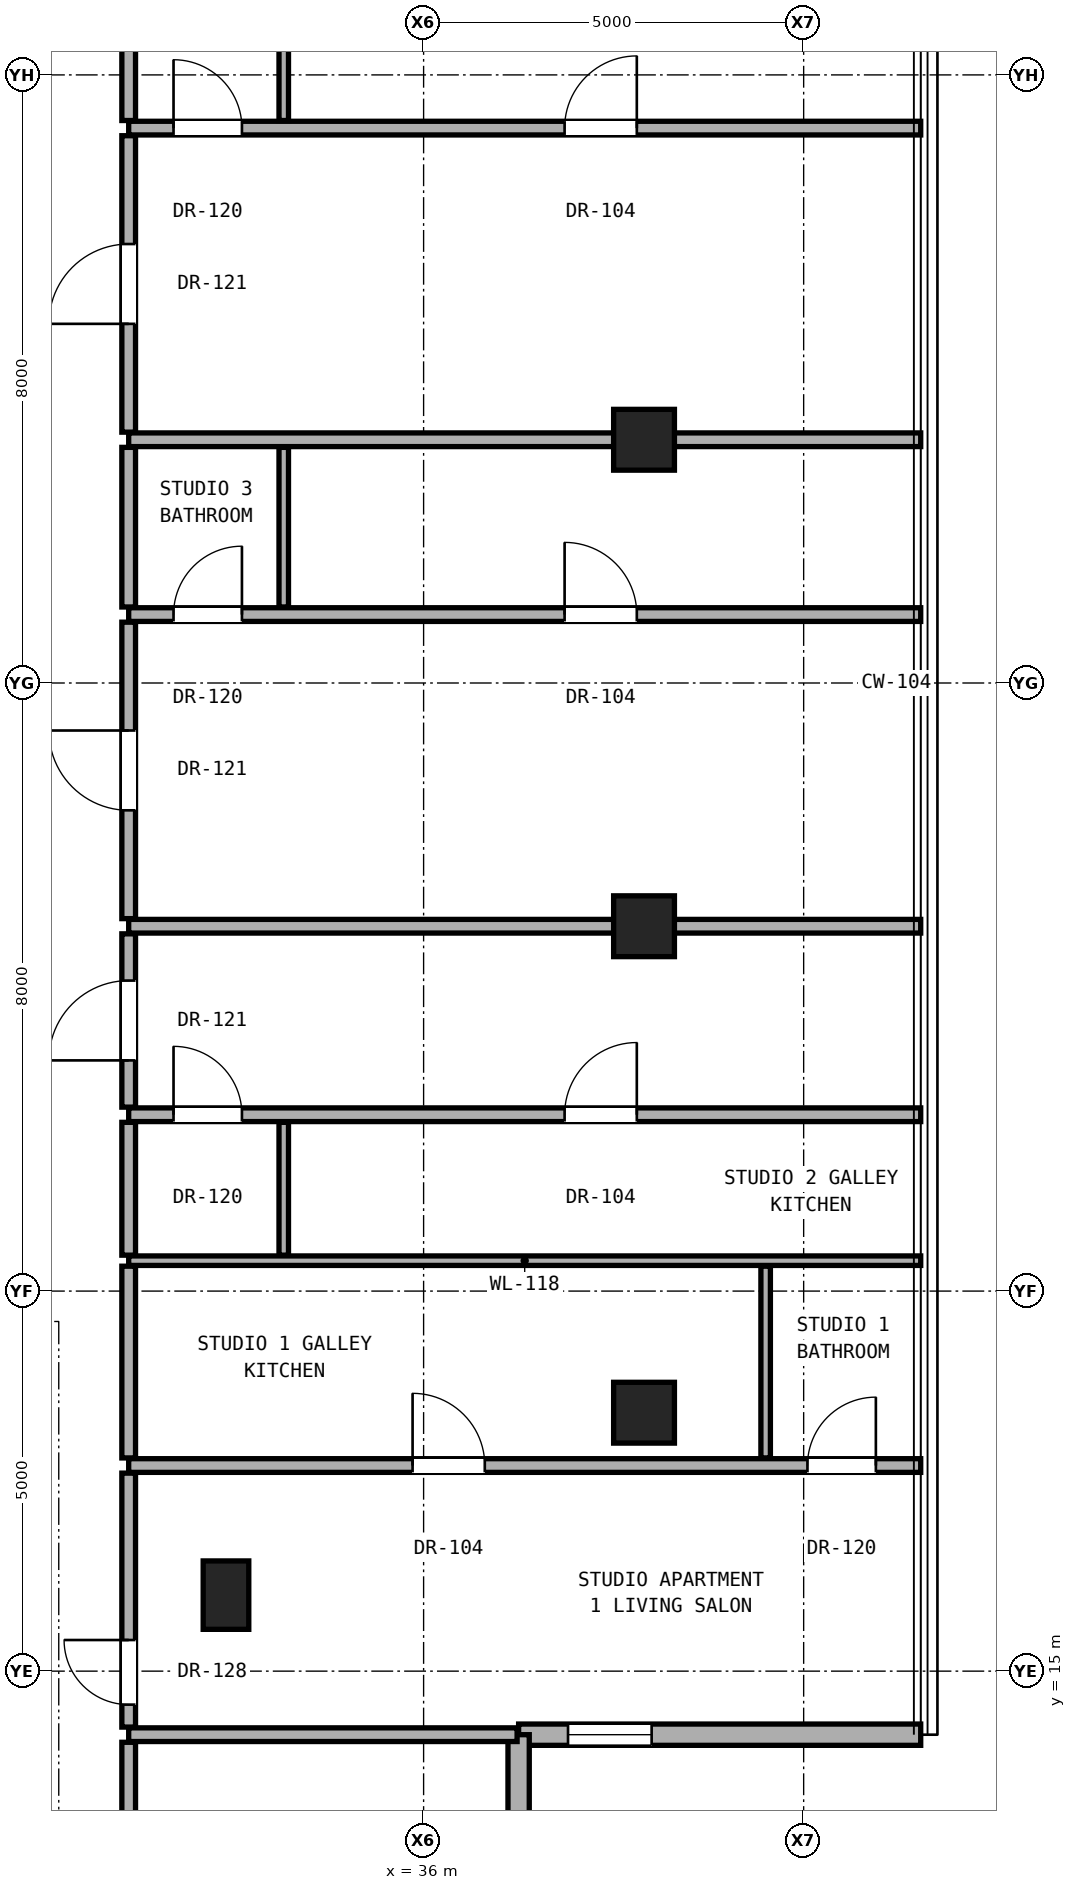
"""IFC4 building model, lengths in metres.
Left out: names, types, materials, properties, quantities, classifications, styles, units other than length and angle.
Written with IfcOpenShell. Run it as: python <this file> out.ifc"""

import sys

from ifc_helpers import new_model, si_unit, direction, frame, frame_2d, origin, origin_2d, place, context, subcontext, project, spatial, rectangle, hollow_rectangle, extrude, element, fill, save


model = new_model("IFC4")
c1 = context("Model", 3, precision=1e-05, world=origin(), true_north=direction((0.0, 1.0)))
c2 = subcontext(c1, "Body", "Model", "MODEL_VIEW")
j1 = project(units=[si_unit("LENGTHUNIT", "METRE"), si_unit("PLANEANGLEUNIT", "RADIAN")], contexts=[c1])
p1 = place(None, origin())
s1 = spatial("IfcSite", under=j1, at=p1, CompositionType="ELEMENT")
p2 = place(p1, origin())
s2 = spatial("IfcBuilding", under=s1, at=p2, CompositionType="ELEMENT")
p3 = place(p2, frame((0.0, 0.0, 242.5)))
s3 = spatial("IfcBuildingStorey", under=s2, at=p3, CompositionType="ELEMENT", Elevation=242.5)
for number, where, z_axis, x_axis in (
    (1, (38.9, 18.4, 0.0), (0.0, 0.0, 1.0), (1.0, 0.0, 0.0)),
    (2, (38.9, 24.8, 0.0), (0.0, 0.0, 1.0), (1.0, 0.0, 0.0)),
    (3, (38.9, 31.2, 0.0), (0.0, 0.0, 1.0), (1.0, 0.0, 0.0)),
):
    element("IfcColumn", number, at=place(p3, frame(where, z_axis=z_axis, x_axis=x_axis)), inside=s3, PredefinedType="COLUMN", context=c2, shape_type="SweptSolid", body=[
        extrude(hollow_rectangle(XDim=0.8, YDim=0.8, WallThickness=0.045, at=origin_2d()), origin(), (0.0, 0.0, 1.0), 3.3),
    ])
p4 = place(p3, frame((33.4, 16.0, 0.0), z_axis=(0.0, 0.0, 1.0), x_axis=(1.0, 0.0, 0.0)))
e4 = element("IfcColumn", 4, at=p4, inside=s3, PredefinedType="PILASTER", context=c2, shape_type="SweptSolid", body=[
    extrude(rectangle(XDim=0.6, YDim=0.9, at=origin_2d()), origin(), (0.0, 0.0, 1.0), 3.3),
])
p5 = place(p3, frame((37.25, 14.164, 0.0), z_axis=(0.0, 0.0, 1.0), x_axis=(1.0, 0.0, 0.0)))
e5 = element("IfcWall", 5, at=p5, inside=s3, PredefinedType="SOLIDWALL", context=c2, shape_type="SweptSolid", body=[
    extrude(rectangle(XDim=5.29, YDim=0.28, at=frame_2d((2.645, 0.0))), origin(), (0.0, 0.0, 1.0), 3.08),
])
p6 = place(p5, frame((0.65, 0.0, 0.85)))
e6 = element("IfcOpeningElement", 6, at=p6, cuts=e5, PredefinedType="OPENING", context=c2, shape_type="SweptSolid", body=[
    extrude(rectangle(XDim=1.1, YDim=2.0, at=frame_2d((0.55, 1.0))), frame((0.0, 0.15, 0.0), z_axis=(0.0, -1.0, 0.0), x_axis=(1.0, 0.0, 0.0)), (0.0, 0.0, 1.0), 0.3),
])
p7 = place(p3, frame((37.25, 8.874, 0.0), z_axis=(0.0, 0.0, 1.0), x_axis=(0.0, 1.0, 0.0)))
e7 = element("IfcWall", 7, at=p7, inside=s3, PredefinedType="SOLIDWALL", context=c2, shape_type="SweptSolid", body=[
    extrude(rectangle(XDim=5.29, YDim=0.28, at=frame_2d((2.645, 0.0))), origin(), (0.0, 0.0, 1.0), 3.08),
])
p8 = place(p3, frame((32.12, 14.164, 0.0), z_axis=(0.0, 0.0, 1.0), x_axis=(1.0, 0.0, 0.0)))
e8 = element("IfcWall", 8, at=p8, inside=s3, PredefinedType="PARTITIONING", context=c2, shape_type="SweptSolid", body=[
    extrude(rectangle(XDim=5.11, YDim=0.18, at=frame_2d((2.555, 0.0))), origin(), (0.0, 0.0, 1.0), 3.1),
])
p9 = place(p3, frame((32.12, 17.705, 0.0), z_axis=(0.0, 0.0, 1.0), x_axis=(1.0, 0.0, 0.0)))
e9 = element("IfcWall", 9, at=p9, inside=s3, PredefinedType="PARTITIONING", context=c2, shape_type="SweptSolid", body=[
    extrude(rectangle(XDim=10.42, YDim=0.18, at=frame_2d((5.21, 0.0))), origin(), (0.0, 0.0, 1.0), 2.543),
])
p10 = place(p9, frame((3.735, 0.0, 0.0)))
e10 = element("IfcOpeningElement", 10, at=p10, cuts=e9, PredefinedType="OPENING", context=c2, shape_type="SweptSolid", body=[
    extrude(rectangle(XDim=0.95, YDim=2.15, at=frame_2d((0.475, 1.075))), frame((0.0, 0.1, 0.0), z_axis=(0.0, -1.0, 0.0), x_axis=(1.0, 0.0, 0.0)), (0.0, 0.0, 1.0), 0.2),
])
p11 = place(p9, frame((8.93, 0.0, 0.0)))
e11 = element("IfcOpeningElement", 11, at=p11, cuts=e9, PredefinedType="OPENING", context=c2, shape_type="SweptSolid", body=[
    extrude(rectangle(XDim=0.9, YDim=2.1, at=frame_2d((0.45, 1.05))), frame((0.0, 0.1, 0.0), z_axis=(0.0, -1.0, 0.0), x_axis=(1.0, 0.0, 0.0)), (0.0, 0.0, 1.0), 0.2),
])
p12 = place(p3, frame((32.12, 20.4, 0.0), z_axis=(0.0, 0.0, 1.0), x_axis=(1.0, 0.0, 0.0)))
e12 = element("IfcWall", 12, at=p12, inside=s3, PredefinedType="PARTITIONING", context=c2, shape_type="SweptSolid", body=[
    extrude(rectangle(XDim=10.42, YDim=0.125, at=frame_2d((5.21, 0.0))), origin(), (0.0, 0.0, 1.0), 2.319),
])
p13 = place(p3, frame((32.12, 22.32, 0.0), z_axis=(0.0, 0.0, 1.0), x_axis=(1.0, 0.0, 0.0)))
e13 = element("IfcWall", 13, at=p13, inside=s3, PredefinedType="PARTITIONING", context=c2, shape_type="SweptSolid", body=[
    extrude(rectangle(XDim=10.42, YDim=0.18, at=frame_2d((5.21, 0.0))), origin(), (0.0, 0.0, 1.0), 2.319),
])
p14 = place(p13, frame((5.735, 0.0, 0.0)))
e14 = element("IfcOpeningElement", 14, at=p14, cuts=e13, PredefinedType="OPENING", context=c2, shape_type="SweptSolid", body=[
    extrude(rectangle(XDim=0.95, YDim=2.15, at=frame_2d((0.475, 1.075))), frame((0.0, 0.1, 0.0), z_axis=(0.0, -1.0, 0.0), x_axis=(1.0, 0.0, 0.0)), (0.0, 0.0, 1.0), 0.2),
])
p15 = place(p13, frame((0.59, 0.0, 0.0)))
e15 = element("IfcOpeningElement", 15, at=p15, cuts=e13, PredefinedType="OPENING", context=c2, shape_type="SweptSolid", body=[
    extrude(rectangle(XDim=0.9, YDim=2.1, at=frame_2d((0.45, 1.05))), frame((0.0, 0.1, 0.0), z_axis=(0.0, -1.0, 0.0), x_axis=(1.0, 0.0, 0.0)), (0.0, 0.0, 1.0), 0.2),
])
p16 = place(p3, frame((32.12, 24.8, 0.0), z_axis=(0.0, 0.0, 1.0), x_axis=(1.0, 0.0, 0.0)))
e16 = element("IfcWall", 16, at=p16, inside=s3, PredefinedType="PARTITIONING", context=c2, shape_type="SweptSolid", body=[
    extrude(rectangle(XDim=10.42, YDim=0.18, at=frame_2d((5.21, 0.0))), origin(), (0.0, 0.0, 1.0), 2.319),
])
p17 = place(p3, frame((32.12, 28.9, 0.0), z_axis=(0.0, 0.0, 1.0), x_axis=(1.0, 0.0, 0.0)))
e17 = element("IfcWall", 17, at=p17, inside=s3, PredefinedType="PARTITIONING", context=c2, shape_type="SweptSolid", body=[
    extrude(rectangle(XDim=10.42, YDim=0.18, at=frame_2d((5.21, 0.0))), origin(), (0.0, 0.0, 1.0), 2.319),
])
p18 = place(p17, frame((5.735, 0.0, 0.0)))
e18 = element("IfcOpeningElement", 18, at=p18, cuts=e17, PredefinedType="OPENING", context=c2, shape_type="SweptSolid", body=[
    extrude(rectangle(XDim=0.95, YDim=2.15, at=frame_2d((0.475, 1.075))), frame((0.0, 0.1, 0.0), z_axis=(0.0, -1.0, 0.0), x_axis=(1.0, 0.0, 0.0)), (0.0, 0.0, 1.0), 0.2),
])
p19 = place(p17, frame((0.59, 0.0, 0.0)))
e19 = element("IfcOpeningElement", 19, at=p19, cuts=e17, PredefinedType="OPENING", context=c2, shape_type="SweptSolid", body=[
    extrude(rectangle(XDim=0.9, YDim=2.1, at=frame_2d((0.45, 1.05))), frame((0.0, 0.1, 0.0), z_axis=(0.0, -1.0, 0.0), x_axis=(1.0, 0.0, 0.0)), (0.0, 0.0, 1.0), 0.2),
])
p20 = place(p3, frame((32.12, 31.2, 0.0), z_axis=(0.0, 0.0, 1.0), x_axis=(1.0, 0.0, 0.0)))
e20 = element("IfcWall", 20, at=p20, inside=s3, PredefinedType="PARTITIONING", context=c2, shape_type="SweptSolid", body=[
    extrude(rectangle(XDim=10.42, YDim=0.18, at=frame_2d((5.21, 0.0))), origin(), (0.0, 0.0, 1.0), 2.319),
])
p21 = place(p3, frame((32.12, 35.3, 0.0), z_axis=(0.0, 0.0, 1.0), x_axis=(1.0, 0.0, 0.0)))
e21 = element("IfcWall", 21, at=p21, inside=s3, PredefinedType="PARTITIONING", context=c2, shape_type="SweptSolid", body=[
    extrude(rectangle(XDim=10.42, YDim=0.18, at=frame_2d((5.21, 0.0))), origin(), (0.0, 0.0, 1.0), 2.319),
])
p22 = place(p21, frame((5.735, 0.0, 0.0)))
e22 = element("IfcOpeningElement", 22, at=p22, cuts=e21, PredefinedType="OPENING", context=c2, shape_type="SweptSolid", body=[
    extrude(rectangle(XDim=0.95, YDim=2.15, at=frame_2d((0.475, 1.075))), frame((0.0, 0.1, 0.0), z_axis=(0.0, -1.0, 0.0), x_axis=(1.0, 0.0, 0.0)), (0.0, 0.0, 1.0), 0.2),
])
p23 = place(p21, frame((0.59, 0.0, 0.0)))
e23 = element("IfcOpeningElement", 23, at=p23, cuts=e21, PredefinedType="OPENING", context=c2, shape_type="SweptSolid", body=[
    extrude(rectangle(XDim=0.9, YDim=2.1, at=frame_2d((0.45, 1.05))), frame((0.0, 0.1, 0.0), z_axis=(0.0, -1.0, 0.0), x_axis=(1.0, 0.0, 0.0)), (0.0, 0.0, 1.0), 0.2),
])
p24 = place(p3, frame((32.12, 8.874, 0.0), z_axis=(0.0, 0.0, 1.0), x_axis=(0.0, 1.0, 0.0)))
e24 = element("IfcWall", 24, at=p24, inside=s3, PredefinedType="PARTITIONING", context=c2, shape_type="SweptSolid", body=[
    extrude(rectangle(XDim=5.19, YDim=0.18, at=frame_2d((2.595, 0.0))), origin(), (0.0, 0.0, 1.0), 3.1),
])
p25 = place(p24, frame((2.12, 0.0, 0.0)))
e25 = element("IfcOpeningElement", 25, at=p25, cuts=e24, PredefinedType="OPENING", context=c2, shape_type="SweptSolid", body=[
    extrude(rectangle(XDim=0.95, YDim=2.15, at=frame_2d((0.475, 1.075))), frame((0.0, 0.1, 0.0), z_axis=(0.0, -1.0, 0.0), x_axis=(1.0, 0.0, 0.0)), (0.0, 0.0, 1.0), 0.2),
])
p26 = place(p3, frame((32.12, 14.264, 0.0), z_axis=(0.0, 0.0, 1.0), x_axis=(0.0, 1.0, 0.0)))
e26 = element("IfcWall", 26, at=p26, inside=s3, PredefinedType="PARTITIONING", context=c2, shape_type="SweptSolid", body=[
    extrude(rectangle(XDim=3.341, YDim=0.18, at=frame_2d((1.67, 0.0))), origin(), (0.0, 0.0, 1.0), 2.543),
])
p27 = place(p26, frame((0.295, 0.0, 0.0)))
e27 = element("IfcOpeningElement", 27, at=p27, cuts=e26, PredefinedType="OPENING", context=c2, shape_type="SweptSolid", body=[
    extrude(rectangle(XDim=0.85, YDim=2.01, at=frame_2d((0.425, 1.005))), frame((0.0, 0.1, 0.0), z_axis=(0.0, -1.0, 0.0), x_axis=(1.0, 0.0, 0.0)), (0.0, 0.0, 1.0), 0.2),
])
p28 = place(p3, frame((32.12, 17.805, 0.0), z_axis=(0.0, 0.0, 1.0), x_axis=(0.0, 1.0, 0.0)))
e28 = element("IfcWall", 28, at=p28, inside=s3, PredefinedType="PARTITIONING", context=c2, shape_type="SweptSolid", body=[
    extrude(rectangle(XDim=2.522, YDim=0.18, at=frame_2d((1.261, 0.0))), origin(), (0.0, 0.0, 1.0), 2.492),
])
p29 = place(p3, frame((32.12, 20.472, 0.0), z_axis=(0.0, 0.0, 1.0), x_axis=(0.0, 1.0, 0.0)))
e29 = element("IfcWall", 29, at=p29, inside=s3, PredefinedType="PARTITIONING", context=c2, shape_type="SweptSolid", body=[
    extrude(rectangle(XDim=1.748, YDim=0.18, at=frame_2d((0.874, 0.0))), origin(), (0.0, 0.0, 1.0), 3.1),
])
p30 = place(p3, frame((32.12, 22.42, 0.0), z_axis=(0.0, 0.0, 1.0), x_axis=(0.0, 1.0, 0.0)))
e30 = element("IfcWall", 30, at=p30, inside=s3, PredefinedType="PARTITIONING", context=c2, shape_type="SweptSolid", body=[
    extrude(rectangle(XDim=2.28, YDim=0.18, at=frame_2d((1.14, 0.0))), origin(), (0.0, 0.0, 1.0), 2.396),
])
p31 = place(p30, frame((0.615, 0.0, 0.0)))
e31 = element("IfcOpeningElement", 31, at=p31, cuts=e30, PredefinedType="OPENING", context=c2, shape_type="SweptSolid", body=[
    extrude(rectangle(XDim=1.05, YDim=2.2, at=frame_2d((0.525, 1.1))), frame((0.0, 0.1, 0.0), z_axis=(0.0, -1.0, 0.0), x_axis=(1.0, 0.0, 0.0)), (0.0, 0.0, 1.0), 0.2),
])
p32 = place(p3, frame((32.12, 24.9, 0.0), z_axis=(0.0, 0.0, 1.0), x_axis=(0.0, 1.0, 0.0)))
e32 = element("IfcWall", 32, at=p32, inside=s3, PredefinedType="PARTITIONING", context=c2, shape_type="SweptSolid", body=[
    extrude(rectangle(XDim=3.9, YDim=0.18, at=frame_2d((1.95, 0.0))), origin(), (0.0, 0.0, 1.0), 2.396),
])
p33 = place(p32, frame((1.425, 0.0, 0.0)))
e33 = element("IfcOpeningElement", 33, at=p33, cuts=e32, PredefinedType="OPENING", context=c2, shape_type="SweptSolid", body=[
    extrude(rectangle(XDim=1.05, YDim=2.2, at=frame_2d((0.525, 1.1))), frame((0.0, 0.1, 0.0), z_axis=(0.0, -1.0, 0.0), x_axis=(1.0, 0.0, 0.0)), (0.0, 0.0, 1.0), 0.2),
])
p34 = place(p3, frame((32.12, 29.0, 0.0), z_axis=(0.0, 0.0, 1.0), x_axis=(0.0, 1.0, 0.0)))
e34 = element("IfcWall", 34, at=p34, inside=s3, PredefinedType="PARTITIONING", context=c2, shape_type="SweptSolid", body=[
    extrude(rectangle(XDim=2.1, YDim=0.18, at=frame_2d((1.05, 0.0))), origin(), (0.0, 0.0, 1.0), 2.396),
])
p35 = place(p3, frame((32.12, 31.3, 0.0), z_axis=(0.0, 0.0, 1.0), x_axis=(0.0, 1.0, 0.0)))
e35 = element("IfcWall", 35, at=p35, inside=s3, PredefinedType="PARTITIONING", context=c2, shape_type="SweptSolid", body=[
    extrude(rectangle(XDim=3.9, YDim=0.18, at=frame_2d((1.95, 0.0))), origin(), (0.0, 0.0, 1.0), 2.396),
])
p36 = place(p35, frame((1.425, 0.0, 0.0)))
e36 = element("IfcOpeningElement", 36, at=p36, cuts=e35, PredefinedType="OPENING", context=c2, shape_type="SweptSolid", body=[
    extrude(rectangle(XDim=1.05, YDim=2.2, at=frame_2d((0.525, 1.1))), frame((0.0, 0.1, 0.0), z_axis=(0.0, -1.0, 0.0), x_axis=(1.0, 0.0, 0.0)), (0.0, 0.0, 1.0), 0.2),
])
p37 = place(p3, frame((32.12, 35.4, 0.0), z_axis=(0.0, 0.0, 1.0), x_axis=(0.0, 1.0, 0.0)))
e37 = element("IfcWall", 37, at=p37, inside=s3, PredefinedType="PARTITIONING", context=c2, shape_type="SweptSolid", body=[
    extrude(rectangle(XDim=2.1, YDim=0.18, at=frame_2d((1.05, 0.0))), origin(), (0.0, 0.0, 1.0), 2.492),
])
p38 = place(p3, frame((34.16, 20.472, 0.0), z_axis=(0.0, 0.0, 1.0), x_axis=(0.0, 1.0, 0.0)))
e38 = element("IfcWall", 38, at=p38, inside=s3, PredefinedType="PARTITIONING", context=c2, shape_type="SweptSolid", body=[
    extrude(rectangle(XDim=1.748, YDim=0.125, at=frame_2d((0.874, 0.0))), origin(), (0.0, 0.0, 1.0), 3.1),
])
p39 = place(p3, frame((34.16, 29.0, 0.0), z_axis=(0.0, 0.0, 1.0), x_axis=(0.0, 1.0, 0.0)))
e39 = element("IfcWall", 39, at=p39, inside=s3, PredefinedType="PARTITIONING", context=c2, shape_type="SweptSolid", body=[
    extrude(rectangle(XDim=2.1, YDim=0.125, at=frame_2d((1.05, 0.0))), origin(), (0.0, 0.0, 1.0), 2.396),
])
p40 = place(p3, frame((34.16, 35.4, 0.0), z_axis=(0.0, 0.0, 1.0), x_axis=(0.0, 1.0, 0.0)))
e40 = element("IfcWall", 40, at=p40, inside=s3, PredefinedType="PARTITIONING", context=c2, shape_type="SweptSolid", body=[
    extrude(rectangle(XDim=2.1, YDim=0.125, at=frame_2d((1.05, 0.0))), origin(), (0.0, 0.0, 1.0), 2.492),
])
p41 = place(p3, frame((40.5, 17.805, 0.0), z_axis=(0.0, 0.0, 1.0), x_axis=(0.0, 1.0, 0.0)))
e41 = element("IfcWall", 41, at=p41, inside=s3, PredefinedType="PARTITIONING", context=c2, shape_type="SweptSolid", body=[
    extrude(rectangle(XDim=2.522, YDim=0.125, at=frame_2d((1.261, 0.0))), origin(), (0.0, 0.0, 1.0), 3.1),
])
p42 = place(p6, origin())
e42 = element("IfcWindow", 42, at=p42, inside=s3, PartitioningType="SINGLE_PANEL", PredefinedType="WINDOW", context=c2, shape_type="SweptSolid", body=[
    extrude(rectangle(XDim=1.1, YDim=2.0, at=frame_2d((0.55, 1.0))), frame((0.0, 0.03, 0.0), z_axis=(0.0, -1.0, 0.0), x_axis=(1.0, 0.0, 0.0)), (0.0, 0.0, 1.0), 0.06),
])
fill(e6, e42)
p43 = place(p27, origin())
e43 = element("IfcDoor", 43, at=p43, inside=s3, OperationType="SINGLE_SWING_RIGHT", PredefinedType="DOOR", context=c2, shape_type="SweptSolid", body=[
    extrude(rectangle(XDim=0.85, YDim=2.01, at=frame_2d((0.425, 1.005))), frame((0.0, 0.025, 0.0), z_axis=(0.0, -1.0, 0.0), x_axis=(1.0, 0.0, 0.0)), (0.0, 0.0, 1.0), 0.05),
])
fill(e27, e43)
p44 = place(p10, origin())
e44 = element("IfcDoor", 44, at=p44, inside=s3, OperationType="SINGLE_SWING_LEFT", PredefinedType="DOOR", context=c2, shape_type="SweptSolid", body=[
    extrude(rectangle(XDim=0.95, YDim=2.15, at=frame_2d((0.475, 1.075))), frame((0.0, 0.025, 0.0), z_axis=(0.0, -1.0, 0.0), x_axis=(1.0, 0.0, 0.0)), (0.0, 0.0, 1.0), 0.05),
])
fill(e10, e44)
p45 = place(p11, origin())
e45 = element("IfcDoor", 45, at=p45, inside=s3, OperationType="SINGLE_SWING_RIGHT", PredefinedType="DOOR", context=c2, shape_type="SweptSolid", body=[
    extrude(rectangle(XDim=0.9, YDim=2.1, at=frame_2d((0.45, 1.05))), frame((0.0, 0.025, 0.0), z_axis=(0.0, -1.0, 0.0), x_axis=(1.0, 0.0, 0.0)), (0.0, 0.0, 1.0), 0.05),
])
fill(e11, e45)
p46 = place(p31, origin())
e46 = element("IfcDoor", 46, at=p46, inside=s3, OperationType="SINGLE_SWING_LEFT", PredefinedType="DOOR", context=c2, shape_type="SweptSolid", body=[
    extrude(rectangle(XDim=1.05, YDim=2.2, at=frame_2d((0.525, 1.1))), frame((0.0, 0.025, 0.0), z_axis=(0.0, -1.0, 0.0), x_axis=(1.0, 0.0, 0.0)), (0.0, 0.0, 1.0), 0.05),
])
fill(e31, e46)
p47 = place(p14, origin())
e47 = element("IfcDoor", 47, at=p47, inside=s3, OperationType="SINGLE_SWING_RIGHT", PredefinedType="DOOR", context=c2, shape_type="SweptSolid", body=[
    extrude(rectangle(XDim=0.95, YDim=2.15, at=frame_2d((0.475, 1.075))), frame((0.0, 0.025, 0.0), z_axis=(0.0, -1.0, 0.0), x_axis=(1.0, 0.0, 0.0)), (0.0, 0.0, 1.0), 0.05),
])
fill(e14, e47)
p48 = place(p15, origin())
e48 = element("IfcDoor", 48, at=p48, inside=s3, OperationType="SINGLE_SWING_LEFT", PredefinedType="DOOR", context=c2, shape_type="SweptSolid", body=[
    extrude(rectangle(XDim=0.9, YDim=2.1, at=frame_2d((0.45, 1.05))), frame((0.0, 0.025, 0.0), z_axis=(0.0, -1.0, 0.0), x_axis=(1.0, 0.0, 0.0)), (0.0, 0.0, 1.0), 0.05),
])
fill(e15, e48)
p49 = place(p33, origin())
e49 = element("IfcDoor", 49, at=p49, inside=s3, OperationType="SINGLE_SWING_RIGHT", PredefinedType="DOOR", context=c2, shape_type="SweptSolid", body=[
    extrude(rectangle(XDim=1.05, YDim=2.2, at=frame_2d((0.525, 1.1))), frame((0.0, 0.025, 0.0), z_axis=(0.0, -1.0, 0.0), x_axis=(1.0, 0.0, 0.0)), (0.0, 0.0, 1.0), 0.05),
])
fill(e33, e49)
p50 = place(p18, origin())
e50 = element("IfcDoor", 50, at=p50, inside=s3, OperationType="SINGLE_SWING_LEFT", PredefinedType="DOOR", context=c2, shape_type="SweptSolid", body=[
    extrude(rectangle(XDim=0.95, YDim=2.15, at=frame_2d((0.475, 1.075))), frame((0.0, 0.025, 0.0), z_axis=(0.0, -1.0, 0.0), x_axis=(1.0, 0.0, 0.0)), (0.0, 0.0, 1.0), 0.05),
])
fill(e18, e50)
p51 = place(p19, origin())
e51 = element("IfcDoor", 51, at=p51, inside=s3, OperationType="SINGLE_SWING_RIGHT", PredefinedType="DOOR", context=c2, shape_type="SweptSolid", body=[
    extrude(rectangle(XDim=0.9, YDim=2.1, at=frame_2d((0.45, 1.05))), frame((0.0, 0.025, 0.0), z_axis=(0.0, -1.0, 0.0), x_axis=(1.0, 0.0, 0.0)), (0.0, 0.0, 1.0), 0.05),
])
fill(e19, e51)
p52 = place(p36, origin())
e52 = element("IfcDoor", 52, at=p52, inside=s3, OperationType="SINGLE_SWING_LEFT", PredefinedType="DOOR", context=c2, shape_type="SweptSolid", body=[
    extrude(rectangle(XDim=1.05, YDim=2.2, at=frame_2d((0.525, 1.1))), frame((0.0, 0.025, 0.0), z_axis=(0.0, -1.0, 0.0), x_axis=(1.0, 0.0, 0.0)), (0.0, 0.0, 1.0), 0.05),
])
fill(e36, e52)
p53 = place(p22, origin())
e53 = element("IfcDoor", 53, at=p53, inside=s3, OperationType="SINGLE_SWING_RIGHT", PredefinedType="DOOR", context=c2, shape_type="SweptSolid", body=[
    extrude(rectangle(XDim=0.95, YDim=2.15, at=frame_2d((0.475, 1.075))), frame((0.0, 0.025, 0.0), z_axis=(0.0, -1.0, 0.0), x_axis=(1.0, 0.0, 0.0)), (0.0, 0.0, 1.0), 0.05),
])
fill(e22, e53)
p54 = place(p23, origin())
e54 = element("IfcDoor", 54, at=p54, inside=s3, OperationType="SINGLE_SWING_LEFT", PredefinedType="DOOR", context=c2, shape_type="SweptSolid", body=[
    extrude(rectangle(XDim=0.9, YDim=2.1, at=frame_2d((0.45, 1.05))), frame((0.0, 0.025, 0.0), z_axis=(0.0, -1.0, 0.0), x_axis=(1.0, 0.0, 0.0)), (0.0, 0.0, 1.0), 0.05),
])
fill(e23, e54)
save(model, sys.argv[1])
